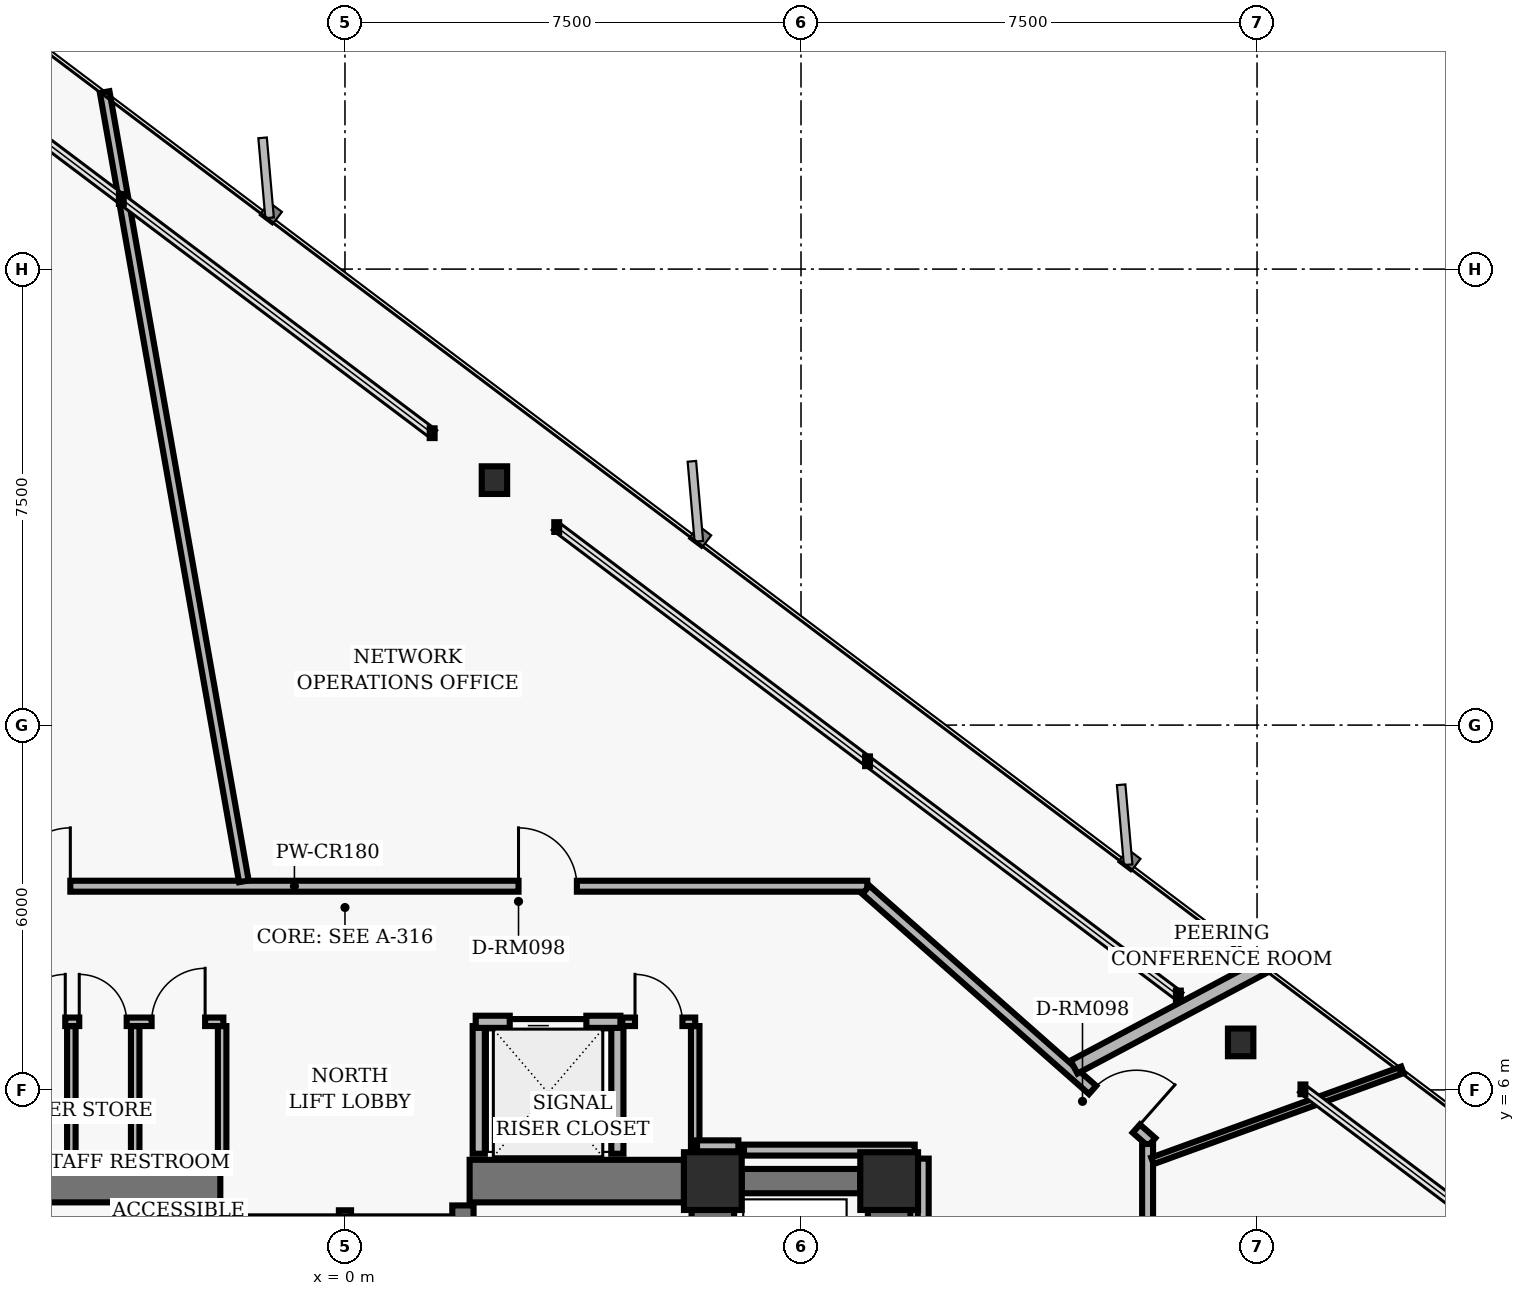
"""IFC4 building model, lengths in metres.
Left out: names, types, materials, properties, quantities, classifications, styles, units other than length and angle.
Written with IfcOpenShell. Run it as: python <this file> out.ifc"""

import sys

from ifc_helpers import new_model, si_unit, direction, frame, frame_2d, origin, origin_2d, place, context, subcontext, project, spatial, rectangle, hollow_rectangle, i_section, extrude, element, fill, save


model = new_model("IFC4")
c1 = context("Model", 3, precision=1e-05, world=origin(), true_north=direction((0.0, 1.0)))
c2 = subcontext(c1, "Body", "Model", "MODEL_VIEW")
j1 = project(units=[si_unit("LENGTHUNIT", "METRE"), si_unit("PLANEANGLEUNIT", "RADIAN")], contexts=[c1])
p1 = place(None, origin())
s1 = spatial("IfcSite", under=j1, at=p1, CompositionType="ELEMENT")
p2 = place(p1, origin())
s2 = spatial("IfcBuilding", under=s1, at=p2, CompositionType="ELEMENT")
p3 = place(p2, frame((0.0, 0.0, 69.76)))
s3 = spatial("IfcBuildingStorey", under=s2, at=p3, CompositionType="ELEMENT", Elevation=69.76)
for number, where, z_axis, x_axis in (
    (1, (6.05, 4.5, 0.0), (0.0, 0.0, 1.0), (1.0, 0.0, 0.0)),
    (2, (8.95, 4.5, 0.0), (0.0, 0.0, 1.0), (1.0, 0.0, 0.0)),
):
    element("IfcColumn", number, at=place(p3, frame(where, z_axis=z_axis, x_axis=x_axis)), inside=s3, PredefinedType="COLUMN", context=c2, shape_type="SweptSolid", body=[
        extrude(hollow_rectangle(XDim=0.95, YDim=0.95, WallThickness=0.06, InnerFilletRadius=0.02, OuterFilletRadius=0.04, at=origin_2d()), origin(), (0.0, 0.0, 1.0), 3.36),
    ])
p4 = place(p3, frame((6.05, 0.475, 0.0), z_axis=(0.0, 0.0, 1.0), x_axis=(0.0, 1.0, 0.0)))
e3 = element("IfcWall", 3, at=p4, inside=s3, PredefinedType="SHEAR", context=c2, shape_type="SweptSolid", body=[
    extrude(rectangle(XDim=3.55, YDim=0.7, at=frame_2d((1.775, 0.0))), origin(), (0.0, 0.0, 1.0), 3.098),
])
for number, where, z_axis, x_axis in (
    (4, (-1.94, -4.1, 0.0), (0.0, 0.0, 1.0), (0.0, 1.0, 0.0)),
    (5, (1.94, -4.1, 0.0), (0.0, 0.0, 1.0), (0.0, 1.0, 0.0)),
):
    element("IfcWall", number, at=place(p3, frame(where, z_axis=z_axis, x_axis=x_axis)), inside=s3, PredefinedType="SHEAR", context=c2, shape_type="SweptSolid", body=[
        extrude(rectangle(XDim=8.2, YDim=0.35, at=frame_2d((4.1, 0.0))), origin(), (0.0, 0.0, 1.0), 3.098),
    ])
for number, where, z_axis, x_axis in (
    (6, (-5.575, 4.5, 0.0), (0.0, 0.0, 1.0), (1.0, 0.0, 0.0)),
    (7, (2.05, 4.5, 0.0), (0.0, 0.0, 1.0), (1.0, 0.0, 0.0)),
):
    element("IfcWall", number, at=place(p3, frame(where, z_axis=z_axis, x_axis=x_axis)), inside=s3, PredefinedType="SHEAR", context=c2, shape_type="SweptSolid", body=[
        extrude(rectangle(XDim=3.525, YDim=0.7, at=frame_2d((1.762, 0.0))), origin(), (0.0, 0.0, 1.0), 3.098),
    ])
p5 = place(p3, frame((8.95, -3.825, 0.0), z_axis=(0.0, 0.0, 1.0), x_axis=(0.0, 1.0, 0.0)))
e8 = element("IfcWall", 8, at=p5, inside=s3, PredefinedType="SHEAR", context=c2, shape_type="SweptSolid", body=[
    extrude(rectangle(XDim=7.85, YDim=0.7, at=frame_2d((3.925, 0.0))), origin(), (0.0, 0.0, 1.0), 3.098),
])
p6 = place(p3, frame((6.525, 4.5, 0.0), z_axis=(0.0, 0.0, 1.0), x_axis=(1.0, 0.0, 0.0)))
e9 = element("IfcWall", 9, at=p6, inside=s3, PredefinedType="SHEAR", context=c2, shape_type="SweptSolid", body=[
    extrude(rectangle(XDim=1.95, YDim=0.4, at=frame_2d((0.975, 0.0))), origin(), (0.0, 0.0, 1.0), 3.098),
])
for number, where, z_axis, x_axis in (
    (10, (14.73, 6.781, 0.0), (0.0, 0.0, 1.0), (1.0, 0.0, 0.0)),
    (11, (2.458, 16.029, 0.0), (0.0, 0.0, 1.0), (1.0, 0.0, 0.0)),
):
    element("IfcColumn", number, at=place(p3, frame(where, z_axis=z_axis, x_axis=x_axis)), inside=s3, PredefinedType="COLUMN", context=c2, shape_type="SweptSolid", body=[
        extrude(i_section(OverallWidth=0.418, OverallDepth=0.455, WebThickness=0.042, FlangeThickness=0.068, FilletRadius=0.025, at=origin_2d()), origin(), (0.0, 0.0, 1.0), 3.36),
    ])
p7 = place(p3, frame((0.0, 1.25, 0.0), z_axis=(0.0, 0.0, 1.0), x_axis=(0.0, 1.0, 0.0)))
e12 = element("IfcWall", 12, at=p7, inside=s3, PredefinedType="PARTITIONING", context=c2, shape_type="SweptSolid", body=[
    extrude(rectangle(XDim=2.77, YDim=0.2, at=frame_2d((1.385, 0.0))), origin(), (0.0, 0.0, 1.0), 3.073),
])
p8 = place(p3, frame((-1.76, 3.82, 0.0), z_axis=(0.0, 0.0, 1.0), x_axis=(1.0, 0.0, 0.0)))
e13 = element("IfcWall", 13, at=p8, inside=s3, PredefinedType="PARTITIONING", context=c2, shape_type="SweptSolid", body=[
    extrude(rectangle(XDim=3.52, YDim=0.2, at=frame_2d((1.76, 0.0))), origin(), (0.0, 0.0, 1.0), 3.073),
])
for number, where, z_axis, x_axis in (
    (14, (2.2, 4.95, 0.0), (0.0, 0.0, 1.0), (0.0, 1.0, 0.0)),
    (15, (4.48, 4.95, 0.0), (0.0, 0.0, 1.0), (0.0, 1.0, 0.0)),
):
    element("IfcWall", number, at=place(p3, frame(where, z_axis=z_axis, x_axis=x_axis)), inside=s3, PredefinedType="PARTITIONING", context=c2, shape_type="SweptSolid", body=[
        extrude(rectangle(XDim=2.1, YDim=0.2, at=frame_2d((1.05, 0.0))), origin(), (0.0, 0.0, 1.0), 3.073),
    ])
p9 = place(p3, frame((2.15, 7.12, 0.0), z_axis=(0.0, 0.0, 1.0), x_axis=(1.0, 0.0, 0.0)))
e16 = element("IfcWall", 16, at=p9, inside=s3, PredefinedType="PARTITIONING", context=c2, shape_type="SweptSolid", body=[
    extrude(rectangle(XDim=2.38, YDim=0.2, at=frame_2d((1.19, 0.0))), origin(), (0.0, 0.0, 1.0), 2.587),
])
p10 = place(p9, frame((0.56, 0.0, 0.0)))
e17 = element("IfcOpeningElement", 17, at=p10, cuts=e16, PredefinedType="OPENING", context=c2, shape_type="SweptSolid", body=[
    extrude(rectangle(XDim=1.26, YDim=2.06, at=frame_2d((0.63, 1.03))), frame((0.0, 0.11, 0.0), z_axis=(0.0, -1.0, 0.0), x_axis=(1.0, 0.0, 0.0)), (0.0, 0.0, 1.0), 0.22),
])
for number, where, z_axis, x_axis in (
    (18, (-4.5, 4.95, 0.0), (0.0, 0.0, 1.0), (0.0, 1.0, 0.0)),
    (19, (-3.45, 4.95, 0.0), (0.0, 0.0, 1.0), (0.0, 1.0, 0.0)),
    (20, (-2.02, 4.95, 0.0), (0.0, 0.0, 1.0), (0.0, 1.0, 0.0)),
):
    element("IfcWall", number, at=place(p3, frame(where, z_axis=z_axis, x_axis=x_axis)), inside=s3, PredefinedType="PARTITIONING", context=c2, shape_type="SweptSolid", body=[
        extrude(rectangle(XDim=2.1, YDim=0.14, at=frame_2d((1.05, 0.0))), origin(), (0.0, 0.0, 1.0), 3.073),
    ])
p11 = place(p3, frame((-5.52, 7.12, 0.0), z_axis=(0.0, 0.0, 1.0), x_axis=(1.0, 0.0, 0.0)))
e21 = element("IfcWall", 21, at=p11, inside=s3, PredefinedType="PARTITIONING", context=c2, shape_type="SweptSolid", body=[
    extrude(rectangle(XDim=3.52, YDim=0.14, at=frame_2d((1.76, 0.0))), origin(), (0.0, 0.0, 1.0), 3.073),
])
p12 = place(p11, frame((0.14, 0.0, 0.0)))
e22 = element("IfcOpeningElement", 22, at=p12, cuts=e21, PredefinedType="OPENING", context=c2, shape_type="SweptSolid", body=[
    extrude(rectangle(XDim=0.78, YDim=2.01, at=frame_2d((0.39, 1.005))), frame((0.0, 0.08, 0.0), z_axis=(0.0, -1.0, 0.0), x_axis=(1.0, 0.0, 0.0)), (0.0, 0.0, 1.0), 0.16),
])
p13 = place(p11, frame((1.15, 0.0, 0.0)))
e23 = element("IfcOpeningElement", 23, at=p13, cuts=e21, PredefinedType="OPENING", context=c2, shape_type="SweptSolid", body=[
    extrude(rectangle(XDim=0.78, YDim=2.01, at=frame_2d((0.39, 1.005))), frame((0.0, 0.08, 0.0), z_axis=(0.0, -1.0, 0.0), x_axis=(1.0, 0.0, 0.0)), (0.0, 0.0, 1.0), 0.16),
])
p14 = place(p11, frame((2.34, 0.0, 0.0)))
e24 = element("IfcOpeningElement", 24, at=p14, cuts=e21, PredefinedType="OPENING", context=c2, shape_type="SweptSolid", body=[
    extrude(rectangle(XDim=0.88, YDim=2.02, at=frame_2d((0.44, 1.01))), frame((0.0, 0.08, 0.0), z_axis=(0.0, -1.0, 0.0), x_axis=(1.0, 0.0, 0.0)), (0.0, 0.0, 1.0), 0.16),
])
p15 = place(p3, frame((5.76, 4.95, 0.0), z_axis=(0.0, 0.0, 1.0), x_axis=(0.0, 1.0, 0.0)))
e25 = element("IfcWall", 25, at=p15, inside=s3, PredefinedType="PARTITIONING", context=c2, shape_type="SweptSolid", body=[
    extrude(rectangle(XDim=2.1, YDim=0.14, at=frame_2d((1.05, 0.0))), origin(), (0.0, 0.0, 1.0), 3.073),
])
p16 = place(p3, frame((4.56, 7.12, 0.0), z_axis=(0.0, 0.0, 1.0), x_axis=(1.0, 0.0, 0.0)))
e26 = element("IfcWall", 26, at=p16, inside=s3, PredefinedType="PARTITIONING", context=c2, shape_type="SweptSolid", body=[
    extrude(rectangle(XDim=1.2, YDim=0.14, at=frame_2d((0.6, 0.0))), origin(), (0.0, 0.0, 1.0), 2.587),
])
p17 = place(p16, frame((0.21, 0.0, 0.0)))
e27 = element("IfcOpeningElement", 27, at=p17, cuts=e26, PredefinedType="OPENING", context=c2, shape_type="SweptSolid", body=[
    extrude(rectangle(XDim=0.78, YDim=2.01, at=frame_2d((0.39, 1.005))), frame((0.0, 0.08, 0.0), z_axis=(0.0, -1.0, 0.0), x_axis=(1.0, 0.0, 0.0)), (0.0, 0.0, 1.0), 0.16),
])
p18 = place(p3, frame((-8.59, 9.35, 0.0), z_axis=(0.0, 0.0, 1.0), x_axis=(1.0, 0.0, 0.0)))
e28 = element("IfcWall", 28, at=p18, inside=s3, PredefinedType="PARTITIONING", context=c2, shape_type="SweptSolid", body=[
    extrude(rectangle(XDim=17.18, YDim=0.18, at=frame_2d((8.59, 0.0))), origin(), (0.0, 0.0, 1.0), 3.073),
])
p19 = place(p18, frame((11.444, 0.0, 0.0)))
e29 = element("IfcOpeningElement", 29, at=p19, cuts=e28, PredefinedType="OPENING", context=c2, shape_type="SweptSolid", body=[
    extrude(rectangle(XDim=0.96, YDim=2.02, at=frame_2d((0.48, 1.01))), frame((0.0, 0.1, 0.0), z_axis=(0.0, -1.0, 0.0), x_axis=(1.0, 0.0, 0.0)), (0.0, 0.0, 1.0), 0.2),
])
p20 = place(p18, frame((3.113, 0.0, 0.0)))
e30 = element("IfcOpeningElement", 30, at=p20, cuts=e28, PredefinedType="OPENING", context=c2, shape_type="SweptSolid", body=[
    extrude(rectangle(XDim=0.96, YDim=2.02, at=frame_2d((0.48, 1.01))), frame((0.0, 0.1, 0.0), z_axis=(0.0, -1.0, 0.0), x_axis=(1.0, 0.0, 0.0)), (0.0, 0.0, 1.0), 0.2),
])
p21 = place(p3, frame((8.567, 9.29, 0.0), z_axis=(0.0, 0.0, 1.0), x_axis=(0.749626463267, -0.66186113768, 0.0)))
e31 = element("IfcWall", 31, at=p21, inside=s3, PredefinedType="PARTITIONING", context=c2, shape_type="SweptSolid", body=[
    extrude(rectangle(XDim=6.27, YDim=0.18, at=frame_2d((3.135, 0.0))), origin(), (0.0, 0.0, 1.0), 2.587),
])
p22 = place(p21, frame((4.972, 0.0, 0.0)))
e32 = element("IfcOpeningElement", 32, at=p22, cuts=e31, PredefinedType="OPENING", context=c2, shape_type="SweptSolid", body=[
    extrude(rectangle(XDim=0.96, YDim=2.02, at=frame_2d((0.48, 1.01))), frame((0.0, 0.1, 0.0), z_axis=(0.0, -1.0, 0.0), x_axis=(1.0, 0.0, 0.0)), (0.0, 0.0, 1.0), 0.2),
])
p23 = place(p3, frame((13.2, 5.11, 0.0), z_axis=(0.0, 0.0, 1.0), x_axis=(0.0, -1.0, 0.0)))
e33 = element("IfcWall", 33, at=p23, inside=s3, PredefinedType="PARTITIONING", context=c2, shape_type="SweptSolid", body=[
    extrude(rectangle(XDim=10.22, YDim=0.18, at=frame_2d((5.11, 0.0))), origin(), (0.0, 0.0, 1.0), 3.073),
])
p24 = place(p23, frame((4.6, 0.0, 0.0)))
e34 = element("IfcOpeningElement", 34, at=p24, cuts=e33, PredefinedType="OPENING", context=c2, shape_type="SweptSolid", body=[
    extrude(rectangle(XDim=1.02, YDim=2.02, at=frame_2d((0.51, 1.01))), frame((0.0, 0.1, 0.0), z_axis=(0.0, -1.0, 0.0), x_axis=(1.0, 0.0, 0.0)), (0.0, 0.0, 1.0), 0.2),
])
p25 = place(p3, frame((9.51, -4.87, 0.0), z_axis=(0.0, 0.0, 1.0), x_axis=(0.0, 1.0, 0.0)))
e35 = element("IfcWall", 35, at=p25, inside=s3, PredefinedType="PARTITIONING", context=c2, shape_type="SweptSolid", body=[
    extrude(rectangle(XDim=9.74, YDim=0.18, at=frame_2d((4.87, 0.0))), origin(), (0.0, 0.0, 1.0), 3.073),
])
p26 = place(p3, frame((9.37, 5.01, 0.0), z_axis=(0.0, 0.0, 1.0), x_axis=(-1.0, 0.0, 0.0)))
e36 = element("IfcWall", 36, at=p26, inside=s3, PredefinedType="PARTITIONING", context=c2, shape_type="SweptSolid", body=[
    extrude(rectangle(XDim=2.808, YDim=0.18, at=frame_2d((1.404, 0.0))), origin(), (0.0, 0.0, 1.0), 3.073),
])
p27 = place(p3, frame((6.47, 5.08, 0.0), z_axis=(0.0, 0.0, 1.0), x_axis=(-1.0, 0.0, 0.0)))
e37 = element("IfcWall", 37, at=p27, inside=s3, PredefinedType="PARTITIONING", context=c2, shape_type="SweptSolid", body=[
    extrude(rectangle(XDim=0.68, YDim=0.18, at=frame_2d((0.34, 0.0))), origin(), (0.0, 0.0, 1.0), 3.073),
])
p28 = place(p3, frame((13.28, 4.833, 0.0), z_axis=(0.0, 0.0, 1.0), x_axis=(0.939689084441, 0.342029859198, 0.0)))
e38 = element("IfcWall", 38, at=p28, inside=s3, PredefinedType="MOVABLE", context=c2, shape_type="SweptSolid", body=[
    extrude(rectangle(XDim=4.374, YDim=0.115, at=frame_2d((2.187, 0.0))), origin(), (0.0, 0.0, 1.0), 3.073),
])
p29 = place(p3, frame((11.99, 6.375, 0.0), z_axis=(0.0, 0.0, 1.0), x_axis=(0.882950733712, 0.469465655654, 0.0)))
e39 = element("IfcWall", 39, at=p29, inside=s3, PredefinedType="PARTITIONING", context=c2, shape_type="SweptSolid", body=[
    extrude(rectangle(XDim=3.546, YDim=0.24, at=frame_2d((1.773, 0.0))), origin(), (0.0, 0.0, 1.0), 3.073),
])
p30 = place(p3, frame((-1.663, 9.43, 0.0), z_axis=(0.0, 0.0, 1.0), x_axis=(-0.17364798238, 0.984807787446, 0.0)))
e40 = element("IfcWall", 40, at=p30, inside=s3, PredefinedType="PARTITIONING", context=c2, shape_type="SweptSolid", body=[
    extrude(rectangle(XDim=13.182, YDim=0.16, at=frame_2d((6.591, 0.0))), origin(), (0.0, 0.0, 1.0), 3.073),
])
p31 = place(p10, origin())
e41 = element("IfcDoor", 41, at=p31, inside=s3, OperationType="SLIDING_TO_LEFT", PredefinedType="DOOR", context=c2, shape_type="SweptSolid", body=[
    extrude(rectangle(XDim=1.26, YDim=2.06, at=frame_2d((0.63, 1.03))), frame((0.0, 0.025, 0.0), z_axis=(0.0, -1.0, 0.0), x_axis=(1.0, 0.0, 0.0)), (0.0, 0.0, 1.0), 0.05),
])
fill(e17, e41)
p32 = place(p12, origin())
e42 = element("IfcDoor", 42, at=p32, inside=s3, OperationType="SINGLE_SWING_RIGHT", PredefinedType="DOOR", context=c2, shape_type="SweptSolid", body=[
    extrude(rectangle(XDim=0.78, YDim=2.01, at=frame_2d((0.39, 1.005))), frame((0.0, 0.025, 0.0), z_axis=(0.0, -1.0, 0.0), x_axis=(1.0, 0.0, 0.0)), (0.0, 0.0, 1.0), 0.05),
])
fill(e22, e42)
p33 = place(p13, origin())
e43 = element("IfcDoor", 43, at=p33, inside=s3, OperationType="SINGLE_SWING_LEFT", PredefinedType="DOOR", context=c2, shape_type="SweptSolid", body=[
    extrude(rectangle(XDim=0.78, YDim=2.01, at=frame_2d((0.39, 1.005))), frame((0.0, 0.025, 0.0), z_axis=(0.0, -1.0, 0.0), x_axis=(1.0, 0.0, 0.0)), (0.0, 0.0, 1.0), 0.05),
])
fill(e23, e43)
p34 = place(p14, origin())
e44 = element("IfcDoor", 44, at=p34, inside=s3, OperationType="SINGLE_SWING_RIGHT", PredefinedType="DOOR", context=c2, shape_type="SweptSolid", body=[
    extrude(rectangle(XDim=0.88, YDim=2.02, at=frame_2d((0.44, 1.01))), frame((0.0, 0.025, 0.0), z_axis=(0.0, -1.0, 0.0), x_axis=(1.0, 0.0, 0.0)), (0.0, 0.0, 1.0), 0.05),
])
fill(e24, e44)
p35 = place(p17, origin())
e45 = element("IfcDoor", 45, at=p35, inside=s3, OperationType="SINGLE_SWING_LEFT", PredefinedType="DOOR", context=c2, shape_type="SweptSolid", body=[
    extrude(rectangle(XDim=0.78, YDim=2.01, at=frame_2d((0.39, 1.005))), frame((0.0, 0.025, 0.0), z_axis=(0.0, -1.0, 0.0), x_axis=(1.0, 0.0, 0.0)), (0.0, 0.0, 1.0), 0.05),
])
fill(e27, e45)
p36 = place(p22, origin())
e46 = element("IfcDoor", 46, at=p36, inside=s3, OperationType="SINGLE_SWING_RIGHT", PredefinedType="DOOR", context=c2, shape_type="SweptSolid", body=[
    extrude(rectangle(XDim=0.96, YDim=2.02, at=frame_2d((0.48, 1.01))), frame((0.0, 0.025, 0.0), z_axis=(0.0, -1.0, 0.0), x_axis=(1.0, 0.0, 0.0)), (0.0, 0.0, 1.0), 0.05),
])
fill(e32, e46)
p37 = place(p19, origin())
e47 = element("IfcDoor", 47, at=p37, inside=s3, OperationType="SINGLE_SWING_LEFT", PredefinedType="DOOR", context=c2, shape_type="SweptSolid", body=[
    extrude(rectangle(XDim=0.96, YDim=2.02, at=frame_2d((0.48, 1.01))), frame((0.0, 0.025, 0.0), z_axis=(0.0, -1.0, 0.0), x_axis=(1.0, 0.0, 0.0)), (0.0, 0.0, 1.0), 0.05),
])
fill(e29, e47)
p38 = place(p20, origin())
e48 = element("IfcDoor", 48, at=p38, inside=s3, OperationType="SINGLE_SWING_RIGHT", PredefinedType="DOOR", context=c2, shape_type="SweptSolid", body=[
    extrude(rectangle(XDim=0.96, YDim=2.02, at=frame_2d((0.48, 1.01))), frame((0.0, 0.025, 0.0), z_axis=(0.0, -1.0, 0.0), x_axis=(1.0, 0.0, 0.0)), (0.0, 0.0, 1.0), 0.05),
])
fill(e30, e48)
save(model, sys.argv[1])
